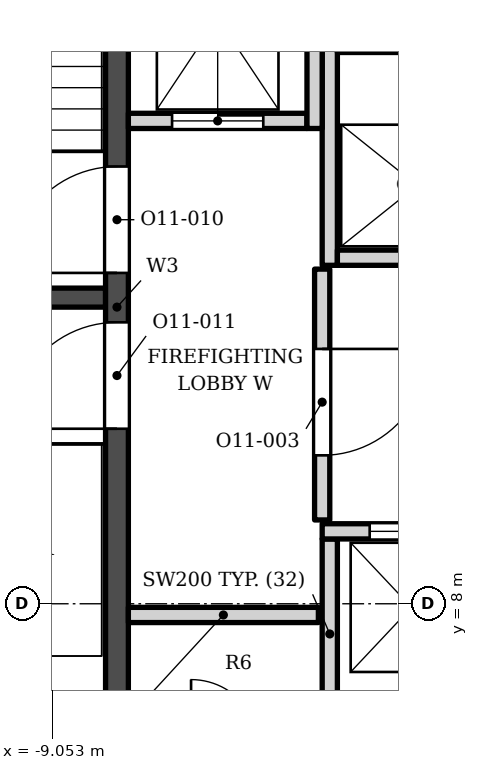
"""IFC4 building model, lengths in metres.
Left out: names, types, materials, properties, quantities, classifications, styles, units other than length and angle.
Written with IfcOpenShell. Run it as: python <this file> out.ifc"""

import sys

from ifc_helpers import new_model, si_unit, direction, frame, frame_2d, origin, place, context, subcontext, project, spatial, rectangle, extrude, element, fill, save


model = new_model("IFC4")
c1 = context("Model", 3, precision=1e-05, world=origin(), true_north=direction((0.0, 1.0)))
c2 = subcontext(c1, "Body", "Model", "MODEL_VIEW")
j1 = project(units=[si_unit("LENGTHUNIT", "METRE"), si_unit("PLANEANGLEUNIT", "RADIAN")], contexts=[c1])
p1 = place(None, origin())
s1 = spatial("IfcSite", under=j1, at=p1, CompositionType="ELEMENT")
p2 = place(p1, origin())
s2 = spatial("IfcBuilding", under=s1, at=p2, CompositionType="ELEMENT")
p3 = place(p2, frame((0.0, 0.0, 271.6)))
s3 = spatial("IfcBuildingStorey", under=s2, at=p3, CompositionType="ELEMENT", Elevation=271.6)
p4 = place(p3, frame((-8.2, 5.253, 0.0), z_axis=(0.0, 0.0, 1.0), x_axis=(0.0, 1.0, 0.0)))
e1 = element("IfcWall", 1, at=p4, inside=s3, PredefinedType="SHEAR", context=c2, shape_type="SweptSolid", body=[
    extrude(rectangle(XDim=13.3, YDim=0.3, at=frame_2d((6.65, 0.0))), origin(), (0.0, 0.0, 1.0), 3.9),
])
p5 = place(p4, frame((7.1, 0.0, 0.0)))
e2 = element("IfcOpeningElement", 2, at=p5, cuts=e1, PredefinedType="OPENING", context=c2, shape_type="SweptSolid", body=[
    extrude(rectangle(XDim=1.4, YDim=2.1, at=frame_2d((0.7, 1.05))), frame((0.0, 0.16, 0.0), z_axis=(0.0, -1.0, 0.0), x_axis=(1.0, 0.0, 0.0)), (0.0, 0.0, 1.0), 0.32),
])
p6 = place(p4, frame((5.05, 0.0, 0.0)))
e3 = element("IfcOpeningElement", 3, at=p6, cuts=e1, PredefinedType="OPENING", context=c2, shape_type="SweptSolid", body=[
    extrude(rectangle(XDim=1.4, YDim=2.1, at=frame_2d((0.7, 1.05))), frame((0.0, 0.16, 0.0), z_axis=(0.0, -1.0, 0.0), x_axis=(1.0, 0.0, 0.0)), (0.0, 0.0, 1.0), 0.32),
])
p7 = place(p3, frame((-12.1, 12.028, 0.0), z_axis=(0.0, 0.0, 1.0), x_axis=(1.0, 0.0, 0.0)))
e4 = element("IfcWall", 4, at=p7, inside=s3, PredefinedType="SHEAR", context=c2, shape_type="SweptSolid", body=[
    extrude(rectangle(XDim=3.75, YDim=0.25, at=frame_2d((1.875, 0.0))), origin(), (0.0, 0.0, 1.0), 3.9),
])
for number, where, z_axis, x_axis in (
    (5, (-5.4, 6.353, 0.0), (0.0, 0.0, 1.0), (0.0, 1.0, 0.0)),
    (6, (-8.05, 7.853, 0.0), (0.0, 0.0, 1.0), (1.0, 0.0, 0.0)),
):
    element("IfcWall", number, at=place(p3, frame(where, z_axis=z_axis, x_axis=x_axis)), inside=s3, PredefinedType="SOLIDWALL", context=c2, shape_type="SweptSolid", body=[
        extrude(rectangle(XDim=2.5, YDim=0.2, at=frame_2d((1.25, 0.0))), origin(), (0.0, 0.0, 1.0), 3.73),
    ])
p8 = place(p3, frame((-5.5, 8.953, 0.0), z_axis=(0.0, 0.0, 1.0), x_axis=(1.0, 0.0, 0.0)))
e7 = element("IfcWall", 7, at=p8, inside=s3, PredefinedType="SOLIDWALL", context=c2, shape_type="SweptSolid", body=[
    extrude(rectangle(XDim=4.5, YDim=0.2, at=frame_2d((2.25, 0.0))), origin(), (0.0, 0.0, 1.0), 3.73),
])
p9 = place(p8, frame((0.625, 0.0, 0.0)))
e8 = element("IfcOpeningElement", 8, at=p9, cuts=e7, PredefinedType="OPENING", context=c2, shape_type="SweptSolid", body=[
    extrude(rectangle(XDim=1.1, YDim=2.1, at=frame_2d((0.55, 1.05))), frame((0.0, 0.11, 0.0), z_axis=(0.0, -1.0, 0.0), x_axis=(1.0, 0.0, 0.0)), (0.0, 0.0, 1.0), 0.22),
])
p10 = place(p8, frame((2.775, 0.0, 0.0)))
e9 = element("IfcOpeningElement", 9, at=p10, cuts=e7, PredefinedType="OPENING", context=c2, shape_type="SweptSolid", body=[
    extrude(rectangle(XDim=1.1, YDim=2.1, at=frame_2d((0.55, 1.05))), frame((0.0, 0.11, 0.0), z_axis=(0.0, -1.0, 0.0), x_axis=(1.0, 0.0, 0.0)), (0.0, 0.0, 1.0), 0.22),
])
p11 = place(p3, frame((-5.5, 9.103, 0.0), z_axis=(0.0, 0.0, 1.0), x_axis=(0.0, 1.0, 0.0)))
e10 = element("IfcWall", 10, at=p11, inside=s3, PredefinedType="SOLIDWALL", context=c2, shape_type="SweptSolid", body=[
    extrude(rectangle(XDim=3.3, YDim=0.2, at=frame_2d((1.65, 0.0))), origin(), (0.0, 0.0, 1.0), 3.73),
])
p12 = place(p11, frame((0.85, 0.0, 0.0)))
e11 = element("IfcOpeningElement", 11, at=p12, cuts=e10, PredefinedType="OPENING", context=c2, shape_type="SweptSolid", body=[
    extrude(rectangle(XDim=1.4, YDim=2.1, at=frame_2d((0.7, 1.05))), frame((0.0, 0.11, 0.0), z_axis=(0.0, -1.0, 0.0), x_axis=(1.0, 0.0, 0.0)), (0.0, 0.0, 1.0), 0.22),
])
p13 = place(p3, frame((-5.4, 12.453, 0.0), z_axis=(0.0, 0.0, 1.0), x_axis=(0.0, 1.0, 0.0)))
e12 = element("IfcWall", 12, at=p13, inside=s3, PredefinedType="SOLIDWALL", context=c2, shape_type="SweptSolid", body=[
    extrude(rectangle(XDim=3.0, YDim=0.2, at=frame_2d((1.5, 0.0))), origin(), (0.0, 0.0, 1.0), 3.73),
])
p14 = place(p3, frame((-5.3, 12.552, 0.0), z_axis=(0.0, 0.0, 1.0), x_axis=(1.0, 0.0, 0.0)))
e13 = element("IfcWall", 13, at=p14, inside=s3, PredefinedType="SOLIDWALL", context=c2, shape_type="SweptSolid", body=[
    extrude(rectangle(XDim=2.1, YDim=0.2, at=frame_2d((1.05, 0.0))), origin(), (0.0, 0.0, 1.0), 3.73),
])
p15 = place(p3, frame((-8.05, 14.353, 0.0), z_axis=(0.0, 0.0, 1.0), x_axis=(1.0, 0.0, 0.0)))
e14 = element("IfcWall", 14, at=p15, inside=s3, PredefinedType="SOLIDWALL", context=c2, shape_type="SweptSolid", body=[
    extrude(rectangle(XDim=2.35, YDim=0.2, at=frame_2d((1.175, 0.0))), origin(), (0.0, 0.0, 1.0), 3.73),
])
p16 = place(p15, frame((0.575, 0.0, 0.0)))
e15 = element("IfcOpeningElement", 15, at=p16, cuts=e14, PredefinedType="OPENING", context=c2, shape_type="SweptSolid", body=[
    extrude(rectangle(XDim=1.2, YDim=2.1, at=frame_2d((0.6, 1.05))), frame((0.0, 0.11, 0.0), z_axis=(0.0, -1.0, 0.0), x_axis=(1.0, 0.0, 0.0)), (0.0, 0.0, 1.0), 0.22),
])
p17 = place(p3, frame((-5.6, 14.253, 0.0), z_axis=(0.0, 0.0, 1.0), x_axis=(0.0, 1.0, 0.0)))
e16 = element("IfcWall", 16, at=p17, inside=s3, PredefinedType="SOLIDWALL", context=c2, shape_type="SweptSolid", body=[
    extrude(rectangle(XDim=4.3, YDim=0.2, at=frame_2d((2.15, 0.0))), origin(), (0.0, 0.0, 1.0), 3.73),
])
p18 = place(p3, frame((-5.3, 15.353, 0.0), z_axis=(0.0, 0.0, 1.0), x_axis=(1.0, 0.0, 0.0)))
e17 = element("IfcWall", 17, at=p18, inside=s3, PredefinedType="SOLIDWALL", context=c2, shape_type="SweptSolid", body=[
    extrude(rectangle(XDim=2.1, YDim=0.2, at=frame_2d((1.05, 0.0))), origin(), (0.0, 0.0, 1.0), 3.73),
])
p19 = place(p9, origin())
e18 = element("IfcDoor", 18, at=p19, inside=s3, OperationType="DOUBLE_DOOR_SLIDING", PredefinedType="DOOR", context=c2, shape_type="SweptSolid", body=[
    extrude(rectangle(XDim=1.1, YDim=2.1, at=frame_2d((0.55, 1.05))), frame((0.0, 0.025, 0.0), z_axis=(0.0, -1.0, 0.0), x_axis=(1.0, 0.0, 0.0)), (0.0, 0.0, 1.0), 0.05),
])
fill(e8, e18)
p20 = place(p16, origin())
e19 = element("IfcDoor", 19, at=p20, inside=s3, OperationType="DOUBLE_DOOR_SLIDING", PredefinedType="DOOR", context=c2, shape_type="SweptSolid", body=[
    extrude(rectangle(XDim=1.2, YDim=2.1, at=frame_2d((0.6, 1.05))), frame((0.0, 0.025, 0.0), z_axis=(0.0, -1.0, 0.0), x_axis=(1.0, 0.0, 0.0)), (0.0, 0.0, 1.0), 0.05),
])
fill(e15, e19)
p21 = place(p5, origin())
e20 = element("IfcDoor", 20, at=p21, inside=s3, OperationType="SINGLE_SWING_LEFT", PredefinedType="DOOR", context=c2, shape_type="SweptSolid", body=[
    extrude(rectangle(XDim=1.4, YDim=2.1, at=frame_2d((0.7, 1.05))), frame((0.0, 0.025, 0.0), z_axis=(0.0, -1.0, 0.0), x_axis=(1.0, 0.0, 0.0)), (0.0, 0.0, 1.0), 0.05),
])
fill(e2, e20)
p22 = place(p6, origin())
e21 = element("IfcDoor", 21, at=p22, inside=s3, OperationType="SINGLE_SWING_LEFT", PredefinedType="DOOR", context=c2, shape_type="SweptSolid", body=[
    extrude(rectangle(XDim=1.4, YDim=2.1, at=frame_2d((0.7, 1.05))), frame((0.0, 0.025, 0.0), z_axis=(0.0, -1.0, 0.0), x_axis=(1.0, 0.0, 0.0)), (0.0, 0.0, 1.0), 0.05),
])
fill(e3, e21)
p23 = place(p12, origin())
e22 = element("IfcDoor", 22, at=p23, inside=s3, OperationType="SINGLE_SWING_RIGHT", PredefinedType="DOOR", context=c2, shape_type="SweptSolid", body=[
    extrude(rectangle(XDim=1.4, YDim=2.1, at=frame_2d((0.7, 1.05))), frame((0.0, 0.025, 0.0), z_axis=(0.0, -1.0, 0.0), x_axis=(1.0, 0.0, 0.0)), (0.0, 0.0, 1.0), 0.05),
])
fill(e11, e22)
save(model, sys.argv[1])
